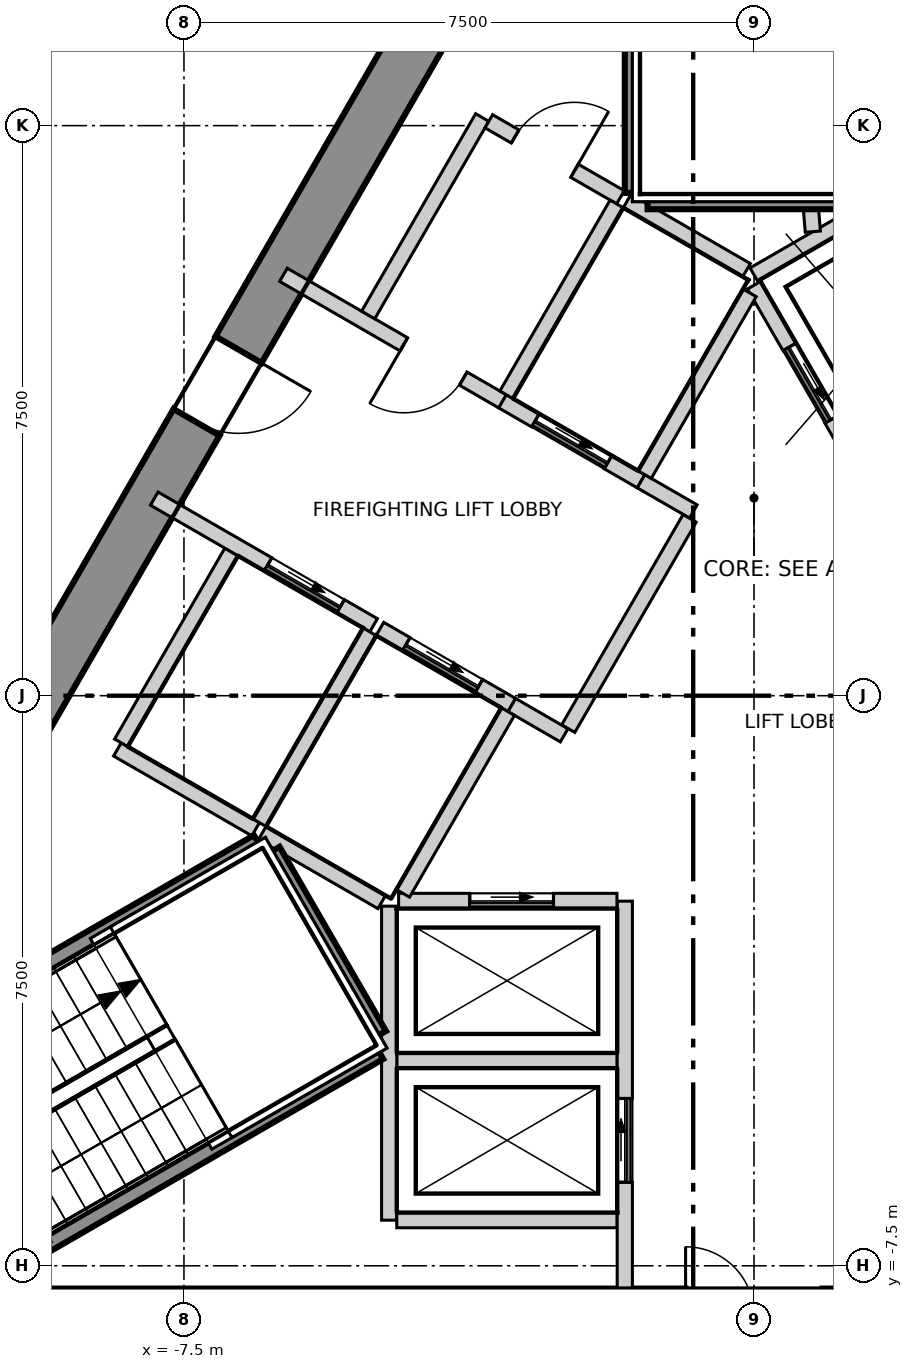
"""IFC4 building model, lengths in metres.
Left out: names, types, materials, properties, quantities, classifications, styles, units other than length and angle.
Written with IfcOpenShell. Run it as: python <this file> out.ifc"""

import sys

from ifc_helpers import new_model, si_unit, direction, frame, frame_2d, origin, place, context, subcontext, project, spatial, polyline, rectangle, outline, extrude, element, fill, save


model = new_model("IFC4")
c1 = context("Model", 3, precision=1e-05, world=origin(), true_north=direction((0.0, 1.0)))
c2 = subcontext(c1, "Body", "Model", "MODEL_VIEW")
j1 = project(units=[si_unit("LENGTHUNIT", "METRE"), si_unit("PLANEANGLEUNIT", "RADIAN")], contexts=[c1])
p1 = place(None, origin())
s1 = spatial("IfcSite", under=j1, at=p1, CompositionType="ELEMENT")
p2 = place(p1, origin())
s2 = spatial("IfcBuilding", under=s1, at=p2, CompositionType="ELEMENT")
p3 = place(p2, frame((0.0, 0.0, 255.8)))
s3 = spatial("IfcBuildingStorey", under=s2, at=p3, CompositionType="ELEMENT", Elevation=255.8)
p4 = place(p3, frame((-1.703, 13.35, -0.6), z_axis=(0.0, 0.0, 1.0), x_axis=(-0.500011533395, -0.866018744874, 0.0)))
e1 = element("IfcWall", 1, at=p4, inside=s3, PredefinedType="SHEAR", context=c2, shape_type="SweptSolid", body=[
    extrude(outline(polyline([(-0.202, -0.35), (1.782, -0.35), (3.766, -0.35), (5.75, -0.35), (7.734, -0.35), (9.718, -0.35), (11.702, -0.35), (13.686, -0.35), (15.67, -0.35), (17.654, -0.35), (19.638, -0.35), (21.622, -0.35), (21.218, 0.35), (19.307, 0.35), (17.397, 0.35), (15.486, 0.35), (13.576, 0.35), (11.665, 0.35), (9.755, 0.35), (7.844, 0.35), (5.934, 0.35), (4.023, 0.35), (2.113, 0.35), (0.202, 0.35), (-0.202, -0.35)])), origin(), (0.0, 0.0, 1.0), 6.3),
])
p5 = place(p4, frame((10.16, 0.0, 0.6)))
e2 = element("IfcOpeningElement", 2, at=p5, cuts=e1, PredefinedType="OPENING", context=c2, shape_type="SweptSolid", body=[
    extrude(rectangle(XDim=1.1, YDim=2.1, at=frame_2d((0.55, 1.05))), frame((0.0, 0.36, 0.0), z_axis=(0.0, -1.0, 0.0), x_axis=(1.0, 0.0, 0.0)), (0.0, 0.0, 1.0), 0.72),
])
p6 = place(p3, frame((-10.71, -8.15, -0.6), z_axis=(0.0, 0.0, 1.0), x_axis=(1.0, 0.0, 0.0)))
e3 = element("IfcWall", 3, at=p6, inside=s3, PredefinedType="SHEAR", context=c2, shape_type="SweptSolid", body=[
    extrude(outline(polyline([(-0.202, -0.35), (1.782, -0.35), (3.766, -0.35), (5.75, -0.35), (7.734, -0.35), (9.718, -0.35), (11.702, -0.35), (13.686, -0.35), (15.67, -0.35), (17.654, -0.35), (19.638, -0.35), (21.622, -0.35), (21.218, 0.35), (19.307, 0.35), (17.397, 0.35), (15.486, 0.35), (13.576, 0.35), (11.665, 0.35), (9.755, 0.35), (7.844, 0.35), (5.934, 0.35), (4.023, 0.35), (2.113, 0.35), (0.202, 0.35), (-0.202, -0.35)])), origin(), (0.0, 0.0, 1.0), 6.3),
])
p7 = place(p6, frame((9.81, 0.0, 0.6)))
e4 = element("IfcOpeningElement", 4, at=p7, cuts=e3, PredefinedType="OPENING", context=c2, shape_type="SweptSolid", body=[
    extrude(rectangle(XDim=1.8, YDim=2.1, at=frame_2d((0.9, 1.05))), frame((0.0, 0.36, 0.0), z_axis=(0.0, -1.0, 0.0), x_axis=(1.0, 0.0, 0.0)), (0.0, 0.0, 1.0), 0.72),
])
p8 = place(p3, frame((-8.376, -0.707, 0.0), z_axis=(0.0, 0.0, 1.0), x_axis=(0.866067520717, -0.499927044236, 0.0)))
e5 = element("IfcWall", 5, at=p8, inside=s3, PredefinedType="SOLIDWALL", context=c2, shape_type="SweptSolid", body=[
    extrude(rectangle(XDim=2.1, YDim=0.2, at=frame_2d((1.05, 0.0))), origin(), (0.0, 0.0, 1.0), 5.7),
])
p9 = place(p3, frame((-8.326, -0.62, 0.0), z_axis=(0.0, 0.0, 1.0), x_axis=(0.500023687443, 0.866011727401, 0.0)))
e6 = element("IfcWall", 6, at=p9, inside=s3, PredefinedType="SOLIDWALL", context=c2, shape_type="SweptSolid", body=[
    extrude(rectangle(XDim=2.9, YDim=0.2, at=frame_2d((1.45, 0.0))), origin(), (0.0, 0.0, 1.0), 5.7),
])
p10 = place(p3, frame((-4.7, -4.8, 0.0), z_axis=(0.0, 0.0, 1.0), x_axis=(1.0, 0.0, 0.0)))
e7 = element("IfcWall", 7, at=p10, inside=s3, PredefinedType="SOLIDWALL", context=c2, shape_type="SweptSolid", body=[
    extrude(rectangle(XDim=2.9, YDim=0.2, at=frame_2d((1.45, 0.0))), origin(), (0.0, 0.0, 1.0), 5.7),
])
p11 = place(p3, frame((-4.8, -6.9, 0.0), z_axis=(0.0, 0.0, 1.0), x_axis=(0.0, 1.0, 0.0)))
e8 = element("IfcWall", 8, at=p11, inside=s3, PredefinedType="SOLIDWALL", context=c2, shape_type="SweptSolid", body=[
    extrude(rectangle(XDim=4.131, YDim=0.2, at=frame_2d((2.065, 0.0))), origin(), (0.0, 0.0, 1.0), 5.7),
])
p12 = place(p3, frame((-4.7, -6.9, 0.0), z_axis=(0.0, 0.0, 1.0), x_axis=(1.0, 0.0, 0.0)))
e9 = element("IfcWall", 9, at=p12, inside=s3, PredefinedType="SOLIDWALL", context=c2, shape_type="SweptSolid", body=[
    extrude(rectangle(XDim=2.9, YDim=0.2, at=frame_2d((1.45, 0.0))), origin(), (0.0, 0.0, 1.0), 5.7),
])
p13 = place(p3, frame((-1.7, -8.13, 0.0), z_axis=(0.0, 0.0, 1.0), x_axis=(0.0, 1.0, 0.0)))
e10 = element("IfcWall", 10, at=p13, inside=s3, PredefinedType="SOLIDWALL", context=c2, shape_type="SweptSolid", body=[
    extrude(rectangle(XDim=5.427, YDim=0.2, at=frame_2d((2.713, 0.0))), origin(), (0.0, 0.0, 1.0), 5.7),
])
p14 = place(p13, frame((1.73, 0.0, 0.0)))
e11 = element("IfcOpeningElement", 11, at=p14, cuts=e10, PredefinedType="OPENING", context=c2, shape_type="SweptSolid", body=[
    extrude(rectangle(XDim=1.1, YDim=2.1, at=frame_2d((0.55, 1.05))), frame((0.0, 0.11, 0.0), z_axis=(0.0, -1.0, 0.0), x_axis=(1.0, 0.0, 0.0)), (0.0, 0.0, 1.0), 0.22),
])
p15 = place(p3, frame((-4.676, -2.7, 0.0), z_axis=(0.0, 0.0, 1.0), x_axis=(1.0, 0.0, 0.0)))
e12 = element("IfcWall", 12, at=p15, inside=s3, PredefinedType="SOLIDWALL", context=c2, shape_type="SweptSolid", body=[
    extrude(rectangle(XDim=2.873, YDim=0.2, at=frame_2d((1.437, 0.0))), origin(), (0.0, 0.0, 1.0), 5.7),
])
p16 = place(p15, frame((0.937, 0.0, 0.0)))
e13 = element("IfcOpeningElement", 13, at=p16, cuts=e12, PredefinedType="OPENING", context=c2, shape_type="SweptSolid", body=[
    extrude(rectangle(XDim=1.1, YDim=2.1, at=frame_2d((0.55, 1.05))), frame((0.0, 0.11, 0.0), z_axis=(0.0, -1.0, 0.0), x_axis=(1.0, 0.0, 0.0)), (0.0, 0.0, 1.0), 0.22),
])
p17 = place(p3, frame((-0.002, 5.541, 0.0), z_axis=(0.0, 0.0, 1.0), x_axis=(0.86600155993, 0.500041296494, 0.0)))
e14 = element("IfcWall", 14, at=p17, inside=s3, PredefinedType="SOLIDWALL", context=c2, shape_type="SweptSolid", body=[
    extrude(rectangle(XDim=4.132, YDim=0.2, at=frame_2d((2.066, 0.0))), origin(), (0.0, 0.0, 1.0), 5.7),
])
p18 = place(p3, frame((0.0, 5.4, 0.0), z_axis=(0.0, 0.0, 1.0), x_axis=(0.500103862429, -0.865965430478, 0.0)))
e15 = element("IfcWall", 15, at=p18, inside=s3, PredefinedType="SOLIDWALL", context=c2, shape_type="SweptSolid", body=[
    extrude(rectangle(XDim=2.973, YDim=0.2, at=frame_2d((1.487, 0.0))), origin(), (0.0, 0.0, 1.0), 5.7),
])
p19 = place(p18, frame((0.937, 0.0, 0.0)))
e16 = element("IfcOpeningElement", 16, at=p19, cuts=e15, PredefinedType="OPENING", context=c2, shape_type="SweptSolid", body=[
    extrude(rectangle(XDim=1.1, YDim=2.1, at=frame_2d((0.55, 1.05))), frame((0.0, 0.11, 0.0), z_axis=(0.0, -1.0, 0.0), x_axis=(1.0, 0.0, 0.0)), (0.0, 0.0, 1.0), 0.22),
])
p20 = place(p3, frame((-7.891, 2.593, 0.0), z_axis=(0.0, 0.0, 1.0), x_axis=(0.866070917804, -0.499921159118, 0.0)))
e17 = element("IfcWall", 17, at=p20, inside=s3, PredefinedType="SOLIDWALL", context=c2, shape_type="SweptSolid", body=[
    extrude(rectangle(XDim=3.333, YDim=0.2, at=frame_2d((1.666, 0.0))), origin(), (0.0, 0.0, 1.0), 5.7),
])
p21 = place(p20, frame((1.73, 0.0, 0.0)))
e18 = element("IfcOpeningElement", 18, at=p21, cuts=e17, PredefinedType="OPENING", context=c2, shape_type="SweptSolid", body=[
    extrude(rectangle(XDim=1.1, YDim=2.1, at=frame_2d((0.55, 1.05))), frame((0.0, 0.11, 0.0), z_axis=(0.0, -1.0, 0.0), x_axis=(1.0, 0.0, 0.0)), (0.0, 0.0, 1.0), 0.22),
])
p22 = place(p3, frame((-3.188, -0.122, 0.0), z_axis=(0.0, 0.0, 1.0), x_axis=(0.865705793592, -0.50055317294, 0.0)))
e19 = element("IfcWall", 19, at=p22, inside=s3, PredefinedType="SOLIDWALL", context=c2, shape_type="SweptSolid", body=[
    extrude(rectangle(XDim=0.797, YDim=0.2, at=frame_2d((0.398, 0.0))), origin(), (0.0, 0.0, 1.0), 5.7),
])
p23 = place(p3, frame((-6.191, 5.537, 0.0), z_axis=(0.0, 0.0, 1.0), x_axis=(0.866052607023, -0.499952879648, 0.0)))
e20 = element("IfcWall", 20, at=p23, inside=s3, PredefinedType="SOLIDWALL", context=c2, shape_type="SweptSolid", body=[
    extrude(rectangle(XDim=3.332, YDim=0.2, at=frame_2d((1.666, 0.0))), origin(), (0.0, 0.0, 1.0), 5.7),
])
p24 = place(p23, frame((1.83, 0.0, 0.0)))
e21 = element("IfcOpeningElement", 21, at=p24, cuts=e20, PredefinedType="OPENING", context=c2, shape_type="SweptSolid", body=[
    extrude(rectangle(XDim=0.9, YDim=2.1, at=frame_2d((0.45, 1.05))), frame((0.0, 0.11, 0.0), z_axis=(0.0, -1.0, 0.0), x_axis=(1.0, 0.0, 0.0)), (0.0, 0.0, 1.0), 0.22),
])
p25 = place(p3, frame((-1.488, 2.822, 0.0), z_axis=(0.0, 0.0, 1.0), x_axis=(0.866236612152, -0.499633997809, 0.0)))
e22 = element("IfcWall", 22, at=p25, inside=s3, PredefinedType="SOLIDWALL", context=c2, shape_type="SweptSolid", body=[
    extrude(rectangle(XDim=0.796, YDim=0.2, at=frame_2d((0.398, 0.0))), origin(), (0.0, 0.0, 1.0), 5.7),
])
p26 = place(p3, frame((-5.076, 5.009, 0.0), z_axis=(0.0, 0.0, 1.0), x_axis=(0.50002537861, 0.866010750942, 0.0)))
e23 = element("IfcWall", 23, at=p26, inside=s3, PredefinedType="SOLIDWALL", context=c2, shape_type="SweptSolid", body=[
    extrude(rectangle(XDim=3.0, YDim=0.2, at=frame_2d((1.5, 0.0))), origin(), (0.0, 0.0, 1.0), 5.7),
])
p27 = place(p3, frame((-3.489, 7.557, 0.0), z_axis=(0.0, 0.0, 1.0), x_axis=(0.866010750942, -0.50002537861, 0.0)))
e24 = element("IfcWall", 24, at=p27, inside=s3, PredefinedType="SOLIDWALL", context=c2, shape_type="SweptSolid", body=[
    extrude(rectangle(XDim=2.0, YDim=0.2, at=frame_2d((1.0, 0.0))), origin(), (0.0, 0.0, 1.0), 5.7),
])
p28 = place(p27, frame((0.401, 0.0, 0.0)))
e25 = element("IfcOpeningElement", 25, at=p28, cuts=e24, PredefinedType="OPENING", context=c2, shape_type="SweptSolid", body=[
    extrude(rectangle(XDim=0.9, YDim=2.1, at=frame_2d((0.45, 1.05))), frame((0.0, 0.11, 0.0), z_axis=(0.0, -1.0, 0.0), x_axis=(1.0, 0.0, 0.0)), (0.0, 0.0, 1.0), 0.22),
])
p29 = place(p3, frame((-2.444, -0.433, 0.0), z_axis=(0.0, 0.0, 1.0), x_axis=(0.500035624827, 0.866004834804, 0.0)))
e26 = element("IfcWall", 26, at=p29, inside=s3, PredefinedType="SOLIDWALL", context=c2, shape_type="SweptSolid", body=[
    extrude(rectangle(XDim=3.194, YDim=0.2, at=frame_2d((1.597, 0.0))), origin(), (0.0, 0.0, 1.0), 5.7),
])
p30 = place(p3, frame((-6.507, -1.67, 0.0), z_axis=(0.0, 0.0, 1.0), x_axis=(0.50012328804, 0.865954211699, 0.0)))
e27 = element("IfcWall", 27, at=p30, inside=s3, PredefinedType="SOLIDWALL", context=c2, shape_type="SweptSolid", body=[
    extrude(rectangle(XDim=2.9, YDim=0.2, at=frame_2d((1.45, 0.0))), origin(), (0.0, 0.0, 1.0), 5.7),
])
p31 = place(p3, frame((-6.47, -1.807, 0.0), z_axis=(0.0, 0.0, 1.0), x_axis=(0.865883195159, -0.500246231712, 0.0)))
e28 = element("IfcWall", 28, at=p31, inside=s3, PredefinedType="SOLIDWALL", context=c2, shape_type="SweptSolid", body=[
    extrude(rectangle(XDim=1.815, YDim=0.2, at=frame_2d((0.908, 0.0))), origin(), (0.0, 0.0, 1.0), 5.7),
])
p32 = place(p3, frame((-4.922, 0.879, 0.0), z_axis=(0.0, 0.0, 1.0), x_axis=(0.866073918653, -0.499915960366, 0.0)))
e29 = element("IfcWall", 29, at=p32, inside=s3, PredefinedType="SOLIDWALL", context=c2, shape_type="SweptSolid", body=[
    extrude(rectangle(XDim=2.002, YDim=0.2, at=frame_2d((1.001, 0.0))), origin(), (0.0, 0.0, 1.0), 5.7),
])
p33 = place(p32, frame((0.402, 0.0, 0.0)))
e30 = element("IfcOpeningElement", 30, at=p33, cuts=e29, PredefinedType="OPENING", context=c2, shape_type="SweptSolid", body=[
    extrude(rectangle(XDim=1.1, YDim=2.1, at=frame_2d((0.55, 1.05))), frame((0.0, 0.11, 0.0), z_axis=(0.0, -1.0, 0.0), x_axis=(1.0, 0.0, 0.0)), (0.0, 0.0, 1.0), 0.22),
])
p34 = place(p3, frame((-4.619, -2.6, 0.0), z_axis=(0.0, 0.0, 1.0), x_axis=(0.50009492287, 0.865970593103, 0.0)))
e31 = element("IfcWall", 31, at=p34, inside=s3, PredefinedType="SOLIDWALL", context=c2, shape_type="SweptSolid", body=[
    extrude(rectangle(XDim=2.761, YDim=0.2, at=frame_2d((1.381, 0.0))), origin(), (0.0, 0.0, 1.0), 5.7),
])
p35 = place(p3, frame((-3.309, 3.873, 0.0), z_axis=(0.0, 0.0, 1.0), x_axis=(0.866098583652, -0.499873227325, 0.0)))
e32 = element("IfcWall", 32, at=p35, inside=s3, PredefinedType="SOLIDWALL", context=c2, shape_type="SweptSolid", body=[
    extrude(rectangle(XDim=2.103, YDim=0.2, at=frame_2d((1.051, 0.0))), origin(), (0.0, 0.0, 1.0), 5.7),
])
p36 = place(p35, frame((0.502, 0.0, 0.0)))
e33 = element("IfcOpeningElement", 33, at=p36, cuts=e32, PredefinedType="OPENING", context=c2, shape_type="SweptSolid", body=[
    extrude(rectangle(XDim=1.1, YDim=2.1, at=frame_2d((0.55, 1.05))), frame((0.0, 0.11, 0.0), z_axis=(0.0, -1.0, 0.0), x_axis=(1.0, 0.0, 0.0)), (0.0, 0.0, 1.0), 0.22),
])
p37 = place(p3, frame((-3.257, 3.959, 0.0), z_axis=(0.0, 0.0, 1.0), x_axis=(0.50012328804, 0.865954211699, 0.0)))
e34 = element("IfcWall", 34, at=p37, inside=s3, PredefinedType="SOLIDWALL", context=c2, shape_type="SweptSolid", body=[
    extrude(rectangle(XDim=2.9, YDim=0.2, at=frame_2d((1.45, 0.0))), origin(), (0.0, 0.0, 1.0), 5.7),
])
p38 = place(p3, frame((-1.67, 6.507, 0.0), z_axis=(0.0, 0.0, 1.0), x_axis=(0.865941441609, -0.500145398563, 0.0)))
e35 = element("IfcWall", 35, at=p38, inside=s3, PredefinedType="SOLIDWALL", context=c2, shape_type="SweptSolid", body=[
    extrude(rectangle(XDim=1.815, YDim=0.2, at=frame_2d((0.908, 0.0))), origin(), (0.0, 0.0, 1.0), 5.7),
])
p39 = place(p3, frame((-1.438, 2.909, 0.0), z_axis=(0.0, 0.0, 1.0), x_axis=(0.499829630636, 0.866123744241, 0.0)))
e36 = element("IfcWall", 36, at=p39, inside=s3, PredefinedType="SOLIDWALL", context=c2, shape_type="SweptSolid", body=[
    extrude(rectangle(XDim=2.761, YDim=0.2, at=frame_2d((1.38, 0.0))), origin(), (0.0, 0.0, 1.0), 5.7),
])
p40 = place(p3, frame((0.75, 6.4, 0.0), z_axis=(0.0, 0.0, 1.0), x_axis=(0.080860177601, -0.996725454515, 0.0)))
e37 = element("IfcWall", 37, at=p40, inside=s3, PredefinedType="SOLIDWALL", context=c2, shape_type="SweptSolid", body=[
    extrude(rectangle(XDim=0.296, YDim=0.2, at=frame_2d((0.148, 0.0))), origin(), (0.0, 0.0, 1.0), 5.7),
])
p41 = place(p3, frame((-12.344, -5.279, 0.0), z_axis=(0.0, 0.0, 1.0), x_axis=(0.866046323291, 0.499963764601, 0.0)))
e38 = element("IfcWall", 38, at=p41, inside=s3, PredefinedType="SOLIDWALL", context=c2, shape_type="SweptSolid", body=[
    extrude(rectangle(XDim=6.714, YDim=0.2, at=frame_2d((3.357, 0.0))), origin(), (0.0, 0.0, 1.0), 5.7),
])
p42 = place(p3, frame((-6.329, -2.038, 0.0), z_axis=(0.0, 0.0, 1.0), x_axis=(0.500200581029, -0.865909567298, 0.0)))
e39 = element("IfcWall", 39, at=p42, inside=s3, PredefinedType="SOLIDWALL", context=c2, shape_type="SweptSolid", body=[
    extrude(rectangle(XDim=2.799, YDim=0.2, at=frame_2d((1.399, 0.0))), origin(), (0.0, 0.0, 1.0), 5.7),
])
p43 = place(p3, frame((-10.744, -8.051, 0.0), z_axis=(0.0, 0.0, 1.0), x_axis=(0.865983344943, 0.500072840975, 0.0)))
e40 = element("IfcWall", 40, at=p43, inside=s3, PredefinedType="SOLIDWALL", context=c2, shape_type="SweptSolid", body=[
    extrude(rectangle(XDim=6.715, YDim=0.2, at=frame_2d((3.357, 0.0))), origin(), (0.0, 0.0, 1.0), 5.7),
])
p44 = place(p3, frame((-1.4, 6.5, 0.0), z_axis=(0.0, 0.0, 1.0), x_axis=(1.0, 0.0, 0.0)))
e41 = element("IfcWall", 41, at=p44, inside=s3, PredefinedType="SOLIDWALL", context=c2, shape_type="SweptSolid", body=[
    extrude(rectangle(XDim=2.8, YDim=0.2, at=frame_2d((1.4, 0.0))), origin(), (0.0, 0.0, 1.0), 5.7),
])
p45 = place(p3, frame((-1.6, 6.615, 0.0), z_axis=(0.0, 0.0, 1.0), x_axis=(0.0, 1.0, 0.0)))
e42 = element("IfcWall", 42, at=p45, inside=s3, PredefinedType="SOLIDWALL", context=c2, shape_type="SweptSolid", body=[
    extrude(rectangle(XDim=6.715, YDim=0.2, at=frame_2d((3.357, 0.0))), origin(), (0.0, 0.0, 1.0), 5.7),
])
p46 = place(p16, origin())
e43 = element("IfcDoor", 43, at=p46, inside=s3, OperationType="SLIDING_TO_LEFT", PredefinedType="DOOR", context=c2, shape_type="SweptSolid", body=[
    extrude(rectangle(XDim=1.1, YDim=2.1, at=frame_2d((0.55, 1.05))), frame((0.0, 0.025, 0.0), z_axis=(0.0, -1.0, 0.0), x_axis=(1.0, 0.0, 0.0)), (0.0, 0.0, 1.0), 0.05),
])
fill(e13, e43)
p47 = place(p14, origin())
e44 = element("IfcDoor", 44, at=p47, inside=s3, OperationType="SLIDING_TO_LEFT", PredefinedType="DOOR", context=c2, shape_type="SweptSolid", body=[
    extrude(rectangle(XDim=1.1, YDim=2.1, at=frame_2d((0.55, 1.05))), frame((0.0, 0.025, 0.0), z_axis=(0.0, -1.0, 0.0), x_axis=(1.0, 0.0, 0.0)), (0.0, 0.0, 1.0), 0.05),
])
fill(e11, e44)
p48 = place(p19, origin())
e45 = element("IfcDoor", 45, at=p48, inside=s3, OperationType="SLIDING_TO_LEFT", PredefinedType="DOOR", context=c2, shape_type="SweptSolid", body=[
    extrude(rectangle(XDim=1.1, YDim=2.1, at=frame_2d((0.55, 1.05))), frame((0.0, 0.025, 0.0), z_axis=(0.0, -1.0, 0.0), x_axis=(1.0, 0.0, 0.0)), (0.0, 0.0, 1.0), 0.05),
])
fill(e16, e45)
p49 = place(p33, origin())
e46 = element("IfcDoor", 46, at=p49, inside=s3, OperationType="SLIDING_TO_LEFT", PredefinedType="DOOR", context=c2, shape_type="SweptSolid", body=[
    extrude(rectangle(XDim=1.1, YDim=2.1, at=frame_2d((0.55, 1.05))), frame((0.0, 0.025, 0.0), z_axis=(0.0, -1.0, 0.0), x_axis=(1.0, 0.0, 0.0)), (0.0, 0.0, 1.0), 0.05),
])
fill(e30, e46)
p50 = place(p36, origin())
e47 = element("IfcDoor", 47, at=p50, inside=s3, OperationType="SLIDING_TO_LEFT", PredefinedType="DOOR", context=c2, shape_type="SweptSolid", body=[
    extrude(rectangle(XDim=1.1, YDim=2.1, at=frame_2d((0.55, 1.05))), frame((0.0, 0.025, 0.0), z_axis=(0.0, -1.0, 0.0), x_axis=(1.0, 0.0, 0.0)), (0.0, 0.0, 1.0), 0.05),
])
fill(e33, e47)
p51 = place(p21, origin())
e48 = element("IfcDoor", 48, at=p51, inside=s3, OperationType="SLIDING_TO_LEFT", PredefinedType="DOOR", context=c2, shape_type="SweptSolid", body=[
    extrude(rectangle(XDim=1.1, YDim=2.1, at=frame_2d((0.55, 1.05))), frame((0.0, 0.025, 0.0), z_axis=(0.0, -1.0, 0.0), x_axis=(1.0, 0.0, 0.0)), (0.0, 0.0, 1.0), 0.05),
])
fill(e18, e48)
p52 = place(p24, origin())
e49 = element("IfcDoor", 49, at=p52, inside=s3, OperationType="SINGLE_SWING_LEFT", PredefinedType="DOOR", context=c2, shape_type="SweptSolid", body=[
    extrude(rectangle(XDim=0.9, YDim=2.1, at=frame_2d((0.45, 1.05))), frame((0.0, 0.025, 0.0), z_axis=(0.0, -1.0, 0.0), x_axis=(1.0, 0.0, 0.0)), (0.0, 0.0, 1.0), 0.05),
])
fill(e21, e49)
p53 = place(p5, origin())
e50 = element("IfcDoor", 50, at=p53, inside=s3, OperationType="SINGLE_SWING_RIGHT", PredefinedType="DOOR", context=c2, shape_type="SweptSolid", body=[
    extrude(rectangle(XDim=1.1, YDim=2.1, at=frame_2d((0.55, 1.05))), frame((0.0, 0.025, 0.0), z_axis=(0.0, -1.0, 0.0), x_axis=(1.0, 0.0, 0.0)), (0.0, 0.0, 1.0), 0.05),
])
fill(e2, e50)
p54 = place(p28, origin())
e51 = element("IfcDoor", 51, at=p54, inside=s3, OperationType="SINGLE_SWING_LEFT", PredefinedType="DOOR", context=c2, shape_type="SweptSolid", body=[
    extrude(rectangle(XDim=0.9, YDim=2.1, at=frame_2d((0.45, 1.05))), frame((0.0, 0.025, 0.0), z_axis=(0.0, -1.0, 0.0), x_axis=(1.0, 0.0, 0.0)), (0.0, 0.0, 1.0), 0.05),
])
fill(e25, e51)
save(model, sys.argv[1])
